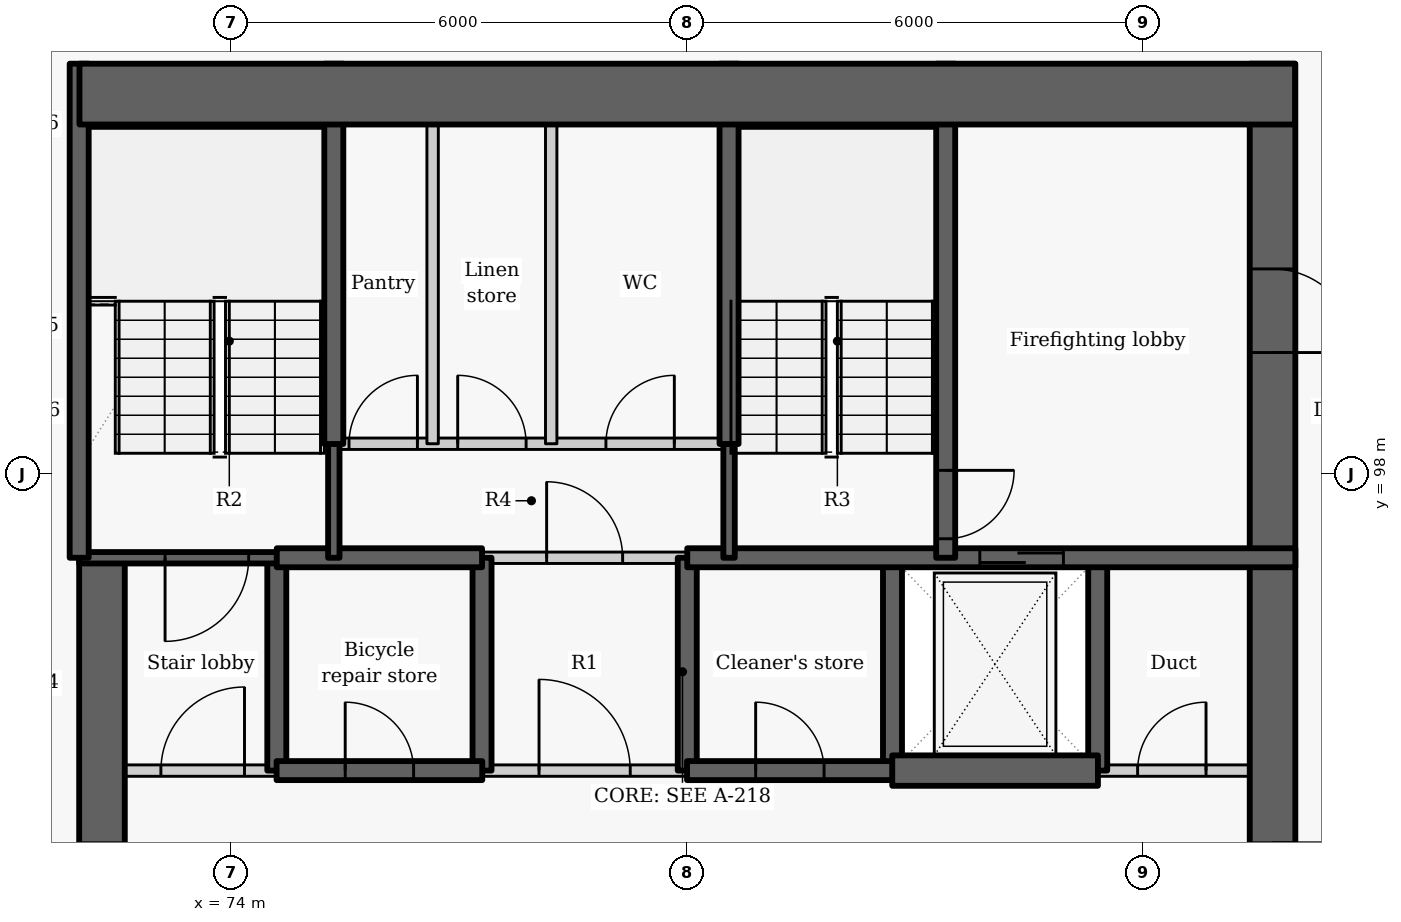
"""IFC4 building model, lengths in metres.
Left out: names, types, materials, properties, quantities, classifications, styles, units other than length and angle.
Written with IfcOpenShell. Run it as: python <this file> out.ifc"""

import sys

from ifc_helpers import new_model, si_unit, direction, frame, frame_2d, origin, place, context, subcontext, project, spatial, rectangle, extrude, element, fill, save


model = new_model("IFC4")
c1 = context("Model", 3, precision=1e-05, world=origin(), true_north=direction((0.0, 1.0)))
c2 = subcontext(c1, "Body", "Model", "MODEL_VIEW")
j1 = project(units=[si_unit("LENGTHUNIT", "METRE"), si_unit("PLANEANGLEUNIT", "RADIAN")], contexts=[c1])
p1 = place(None, origin())
s1 = spatial("IfcSite", under=j1, at=p1, CompositionType="ELEMENT")
p2 = place(p1, origin())
s2 = spatial("IfcBuilding", under=s1, at=p2, CompositionType="ELEMENT")
p3 = place(p2, frame((0.0, 0.0, 87.6)))
s3 = spatial("IfcBuildingStorey", under=s2, at=p3, CompositionType="ELEMENT", Elevation=87.6)
p4 = place(p3, frame((74.6, 94.1, -0.275), z_axis=(0.0, 0.0, 1.0), x_axis=(0.0, 1.0, 0.0)))
e1 = element("IfcWall", 1, at=p4, inside=s3, PredefinedType="SHEAR", context=c2, shape_type="SweptSolid", body=[
    extrude(rectangle(XDim=2.8, YDim=0.25, at=frame_2d((1.4, 0.0))), origin(), (0.0, 0.0, 1.0), 3.3),
])
p5 = place(p3, frame((72.3, 87.8, -0.275), z_axis=(0.0, 0.0, 1.0), x_axis=(0.0, 1.0, 0.0)))
e2 = element("IfcWall", 2, at=p5, inside=s3, PredefinedType="SHEAR", context=c2, shape_type="SweptSolid", body=[
    extrude(rectangle(XDim=9.1, YDim=0.6, at=frame_2d((4.55, 0.0))), origin(), (0.0, 0.0, 1.0), 3.3),
])
p6 = place(p5, frame((3.85, 0.0, 0.275)))
e3 = element("IfcOpeningElement", 3, at=p6, cuts=e2, PredefinedType="OPENING", context=c2, shape_type="SweptSolid", body=[
    extrude(rectangle(XDim=1.5, YDim=2.1, at=frame_2d((0.75, 1.05))), frame((0.0, 0.31, 0.0), z_axis=(0.0, -1.0, 0.0), x_axis=(1.0, 0.0, 0.0)), (0.0, 0.0, 1.0), 0.62),
])
for number, where, z_axis, x_axis in (
    (4, (77.3, 94.1, -0.275), (0.0, 0.0, 1.0), (0.0, 1.0, 0.0)),
    (5, (80.0, 94.1, -0.275), (0.0, 0.0, 1.0), (0.0, 1.0, 0.0)),
    (6, (82.7, 94.1, -0.275), (0.0, 0.0, 1.0), (0.0, 1.0, 0.0)),
    (7, (85.4, 94.1, -0.275), (0.0, 0.0, 1.0), (0.0, 1.0, 0.0)),
):
    element("IfcWall", number, at=place(p3, frame(where, z_axis=z_axis, x_axis=x_axis)), inside=s3, PredefinedType="SHEAR", context=c2, shape_type="SweptSolid", body=[
        extrude(rectangle(XDim=2.8, YDim=0.25, at=frame_2d((1.4, 0.0))), origin(), (0.0, 0.0, 1.0), 3.3),
    ])
p7 = place(p3, frame((87.7, 103.4, -0.275), z_axis=(0.0, 0.0, 1.0), x_axis=(0.0, -1.0, 0.0)))
e8 = element("IfcWall", 8, at=p7, inside=s3, PredefinedType="SHEAR", context=c2, shape_type="SweptSolid", body=[
    extrude(rectangle(XDim=15.6, YDim=0.6, at=frame_2d((7.8, 0.0))), origin(), (0.0, 0.0, 1.0), 3.3),
])
p8 = place(p7, frame((10.25, 0.0, 0.275)))
e9 = element("IfcOpeningElement", 9, at=p8, cuts=e8, PredefinedType="OPENING", context=c2, shape_type="SweptSolid", body=[
    extrude(rectangle(XDim=1.5, YDim=2.1, at=frame_2d((0.75, 1.05))), frame((0.0, 0.31, 0.0), z_axis=(0.0, -1.0, 0.0), x_axis=(1.0, 0.0, 0.0)), (0.0, 0.0, 1.0), 0.62),
])
p9 = place(p7, frame((2.7, 0.0, 0.275)))
e10 = element("IfcOpeningElement", 10, at=p9, cuts=e8, PredefinedType="OPENING", context=c2, shape_type="SweptSolid", body=[
    extrude(rectangle(XDim=1.1, YDim=2.1, at=frame_2d((0.55, 1.05))), frame((0.0, 0.31, 0.0), z_axis=(0.0, -1.0, 0.0), x_axis=(1.0, 0.0, 0.0)), (0.0, 0.0, 1.0), 0.62),
])
p10 = place(p3, frame((72.0, 94.1, 0.0), z_axis=(0.0, 0.0, 1.0), x_axis=(1.0, 0.0, 0.0)))
e11 = element("IfcWall", 11, at=p10, inside=s3, PredefinedType="PARTITIONING", context=c2, shape_type="SweptSolid", body=[
    extrude(rectangle(XDim=2.603, YDim=0.15, at=frame_2d((1.302, 0.0))), origin(), (0.0, 0.0, 1.0), 3.025),
])
p11 = place(p10, frame((1.075, 0.0, 0.0)))
e12 = element("IfcOpeningElement", 12, at=p11, cuts=e11, PredefinedType="OPENING", context=c2, shape_type="SweptSolid", body=[
    extrude(rectangle(XDim=1.1, YDim=2.1, at=frame_2d((0.55, 1.05))), frame((0.0, 0.085, 0.0), z_axis=(0.0, -1.0, 0.0), x_axis=(1.0, 0.0, 0.0)), (0.0, 0.0, 1.0), 0.17),
])
p12 = place(p3, frame((77.297, 94.1, 0.0), z_axis=(0.0, 0.0, 1.0), x_axis=(1.0, 0.0, 0.0)))
e13 = element("IfcWall", 13, at=p12, inside=s3, PredefinedType="PARTITIONING", context=c2, shape_type="SweptSolid", body=[
    extrude(rectangle(XDim=2.706, YDim=0.15, at=frame_2d((1.353, 0.0))), origin(), (0.0, 0.0, 1.0), 3.025),
])
p13 = place(p12, frame((0.753, 0.0, 0.0)))
e14 = element("IfcOpeningElement", 14, at=p13, cuts=e13, PredefinedType="OPENING", context=c2, shape_type="SweptSolid", body=[
    extrude(rectangle(XDim=1.2, YDim=2.1, at=frame_2d((0.6, 1.05))), frame((0.0, 0.085, 0.0), z_axis=(0.0, -1.0, 0.0), x_axis=(1.0, 0.0, 0.0)), (0.0, 0.0, 1.0), 0.17),
])
p14 = place(p3, frame((85.397, 94.1, 0.0), z_axis=(0.0, 0.0, 1.0), x_axis=(1.0, 0.0, 0.0)))
e15 = element("IfcWall", 15, at=p14, inside=s3, PredefinedType="PARTITIONING", context=c2, shape_type="SweptSolid", body=[
    extrude(rectangle(XDim=2.603, YDim=0.15, at=frame_2d((1.302, 0.0))), origin(), (0.0, 0.0, 1.0), 3.025),
])
p15 = place(p14, frame((0.528, 0.0, 0.0)))
e16 = element("IfcOpeningElement", 16, at=p15, cuts=e15, PredefinedType="OPENING", context=c2, shape_type="SweptSolid", body=[
    extrude(rectangle(XDim=0.9, YDim=2.1, at=frame_2d((0.45, 1.05))), frame((0.0, 0.085, 0.0), z_axis=(0.0, -1.0, 0.0), x_axis=(1.0, 0.0, 0.0)), (0.0, 0.0, 1.0), 0.17),
])
p16 = place(p3, frame((74.597, 94.1, -0.275), z_axis=(0.0, 0.0, 1.0), x_axis=(1.0, 0.0, 0.0)))
e17 = element("IfcWall", 17, at=p16, inside=s3, PredefinedType="SHEAR", context=c2, shape_type="SweptSolid", body=[
    extrude(rectangle(XDim=2.706, YDim=0.25, at=frame_2d((1.353, 0.0))), origin(), (0.0, 0.0, 1.0), 3.3),
])
p17 = place(p16, frame((0.903, 0.0, 0.275)))
e18 = element("IfcOpeningElement", 18, at=p17, cuts=e17, PredefinedType="OPENING", context=c2, shape_type="SweptSolid", body=[
    extrude(rectangle(XDim=0.9, YDim=2.1, at=frame_2d((0.45, 1.05))), frame((0.0, 0.135, 0.0), z_axis=(0.0, -1.0, 0.0), x_axis=(1.0, 0.0, 0.0)), (0.0, 0.0, 1.0), 0.27),
])
p18 = place(p3, frame((79.997, 94.1, -0.275), z_axis=(0.0, 0.0, 1.0), x_axis=(1.0, 0.0, 0.0)))
e19 = element("IfcWall", 19, at=p18, inside=s3, PredefinedType="SHEAR", context=c2, shape_type="SweptSolid", body=[
    extrude(rectangle(XDim=2.706, YDim=0.25, at=frame_2d((1.353, 0.0))), origin(), (0.0, 0.0, 1.0), 3.3),
])
p19 = place(p18, frame((0.903, 0.0, 0.275)))
e20 = element("IfcOpeningElement", 20, at=p19, cuts=e19, PredefinedType="OPENING", context=c2, shape_type="SweptSolid", body=[
    extrude(rectangle(XDim=0.9, YDim=2.1, at=frame_2d((0.45, 1.05))), frame((0.0, 0.135, 0.0), z_axis=(0.0, -1.0, 0.0), x_axis=(1.0, 0.0, 0.0)), (0.0, 0.0, 1.0), 0.27),
])
p20 = place(p3, frame((82.697, 94.1, -0.275), z_axis=(0.0, 0.0, 1.0), x_axis=(1.0, 0.0, 0.0)))
e21 = element("IfcWall", 21, at=p20, inside=s3, PredefinedType="SHEAR", context=c2, shape_type="SweptSolid", body=[
    extrude(rectangle(XDim=2.706, YDim=0.4, at=frame_2d((1.353, 0.0))), origin(), (0.0, 0.0, 1.0), 3.3),
])
p21 = place(p3, frame((74.6, 96.9, -0.275), z_axis=(0.0, 0.0, 1.0), x_axis=(-1.0, 0.0, 0.0)))
e22 = element("IfcWall", 22, at=p21, inside=s3, PredefinedType="SHEAR", context=c2, shape_type="SweptSolid", body=[
    extrude(rectangle(XDim=2.6, YDim=0.15, at=frame_2d((1.3, 0.0))), origin(), (0.0, 0.0, 1.0), 3.3),
])
p22 = place(p21, frame((0.37, 0.0, 0.275)))
e23 = element("IfcOpeningElement", 23, at=p22, cuts=e22, PredefinedType="OPENING", context=c2, shape_type="SweptSolid", body=[
    extrude(rectangle(XDim=1.1, YDim=2.1, at=frame_2d((0.55, 1.05))), frame((0.0, 0.085, 0.0), z_axis=(0.0, -1.0, 0.0), x_axis=(1.0, 0.0, 0.0)), (0.0, 0.0, 1.0), 0.17),
])
p23 = place(p3, frame((74.6, 96.9, -0.275), z_axis=(0.0, 0.0, 1.0), x_axis=(1.0, 0.0, 0.0)))
e24 = element("IfcWall", 24, at=p23, inside=s3, PredefinedType="SHEAR", context=c2, shape_type="SweptSolid", body=[
    extrude(rectangle(XDim=2.7, YDim=0.25, at=frame_2d((1.35, 0.0))), origin(), (0.0, 0.0, 1.0), 3.3),
])
p24 = place(p3, frame((80.0, 96.9, -0.275), z_axis=(0.0, 0.0, 1.0), x_axis=(1.0, 0.0, 0.0)))
e25 = element("IfcWall", 25, at=p24, inside=s3, PredefinedType="SHEAR", context=c2, shape_type="SweptSolid", body=[
    extrude(rectangle(XDim=8.0, YDim=0.25, at=frame_2d((4.0, 0.0))), origin(), (0.0, 0.0, 1.0), 3.3),
])
p25 = place(p24, frame((3.849, 0.0, 0.275)))
e26 = element("IfcOpeningElement", 26, at=p25, cuts=e25, PredefinedType="OPENING", context=c2, shape_type="SweptSolid", body=[
    extrude(rectangle(XDim=1.1, YDim=2.1, at=frame_2d((0.55, 1.05))), frame((0.0, 0.135, 0.0), z_axis=(0.0, -1.0, 0.0), x_axis=(1.0, 0.0, 0.0)), (0.0, 0.0, 1.0), 0.27),
])
p26 = place(p3, frame((77.3, 96.9, 0.0), z_axis=(0.0, 0.0, 1.0), x_axis=(1.0, 0.0, 0.0)))
e27 = element("IfcWall", 27, at=p26, inside=s3, PredefinedType="PARTITIONING", context=c2, shape_type="SweptSolid", body=[
    extrude(rectangle(XDim=2.7, YDim=0.15, at=frame_2d((1.35, 0.0))), origin(), (0.0, 0.0, 1.0), 3.025),
])
p27 = place(p26, frame((0.85, 0.0, 0.0)))
e28 = element("IfcOpeningElement", 28, at=p27, cuts=e27, PredefinedType="OPENING", context=c2, shape_type="SweptSolid", body=[
    extrude(rectangle(XDim=1.0, YDim=2.1, at=frame_2d((0.5, 1.05))), frame((0.0, 0.085, 0.0), z_axis=(0.0, -1.0, 0.0), x_axis=(1.0, 0.0, 0.0)), (0.0, 0.0, 1.0), 0.17),
])
p28 = place(p3, frame((75.35, 96.9, -0.275), z_axis=(0.0, 0.0, 1.0), x_axis=(0.0, 1.0, 0.0)))
e29 = element("IfcWall", 29, at=p28, inside=s3, PredefinedType="SHEAR", context=c2, shape_type="SweptSolid", body=[
    extrude(rectangle(XDim=1.503, YDim=0.15, at=frame_2d((0.751, 0.0))), origin(), (0.0, 0.0, 1.0), 3.3),
])
p29 = place(p3, frame((75.35, 98.397, -0.275), z_axis=(0.0, 0.0, 1.0), x_axis=(0.0, 1.0, 0.0)))
e30 = element("IfcWall", 30, at=p29, inside=s3, PredefinedType="SHEAR", context=c2, shape_type="SweptSolid", body=[
    extrude(rectangle(XDim=5.003, YDim=0.25, at=frame_2d((2.501, 0.0))), origin(), (0.0, 0.0, 1.0), 3.3),
])
p30 = place(p3, frame((72.0, 96.9, -0.275), z_axis=(0.0, 0.0, 1.0), x_axis=(0.0, 1.0, 0.0)))
e31 = element("IfcWall", 31, at=p30, inside=s3, PredefinedType="SHEAR", context=c2, shape_type="SweptSolid", body=[
    extrude(rectangle(XDim=6.5, YDim=0.25, at=frame_2d((3.25, 0.0))), origin(), (0.0, 0.0, 1.0), 3.3),
])
p31 = place(p3, frame((83.4, 103.4, -0.275), z_axis=(0.0, 0.0, 1.0), x_axis=(0.0, -1.0, 0.0)))
e32 = element("IfcWall", 32, at=p31, inside=s3, PredefinedType="SHEAR", context=c2, shape_type="SweptSolid", body=[
    extrude(rectangle(XDim=6.5, YDim=0.25, at=frame_2d((3.25, 0.0))), origin(), (0.0, 0.0, 1.0), 3.3),
])
p32 = place(p31, frame((5.35, 0.0, 0.275)))
e33 = element("IfcOpeningElement", 33, at=p32, cuts=e32, PredefinedType="OPENING", context=c2, shape_type="SweptSolid", body=[
    extrude(rectangle(XDim=0.9, YDim=2.1, at=frame_2d((0.45, 1.05))), frame((0.0, 0.135, 0.0), z_axis=(0.0, -1.0, 0.0), x_axis=(1.0, 0.0, 0.0)), (0.0, 0.0, 1.0), 0.27),
])
p33 = place(p3, frame((80.55, 96.9, -0.275), z_axis=(0.0, 0.0, 1.0), x_axis=(0.0, 1.0, 0.0)))
e34 = element("IfcWall", 34, at=p33, inside=s3, PredefinedType="SHEAR", context=c2, shape_type="SweptSolid", body=[
    extrude(rectangle(XDim=1.503, YDim=0.15, at=frame_2d((0.751, 0.0))), origin(), (0.0, 0.0, 1.0), 3.3),
])
p34 = place(p3, frame((80.55, 98.397, -0.275), z_axis=(0.0, 0.0, 1.0), x_axis=(0.0, 1.0, 0.0)))
e35 = element("IfcWall", 35, at=p34, inside=s3, PredefinedType="SHEAR", context=c2, shape_type="SweptSolid", body=[
    extrude(rectangle(XDim=5.003, YDim=0.25, at=frame_2d((2.501, 0.0))), origin(), (0.0, 0.0, 1.0), 3.3),
])
p35 = place(p3, frame((75.35, 98.4, 0.0), z_axis=(0.0, 0.0, 1.0), x_axis=(1.0, 0.0, 0.0)))
e36 = element("IfcWall", 36, at=p35, inside=s3, PredefinedType="PARTITIONING", context=c2, shape_type="SweptSolid", body=[
    extrude(rectangle(XDim=5.2, YDim=0.15, at=frame_2d((2.6, 0.0))), origin(), (0.0, 0.0, 1.0), 3.025),
])
p36 = place(p35, frame((0.2, 0.0, 0.0)))
e37 = element("IfcOpeningElement", 37, at=p36, cuts=e36, PredefinedType="OPENING", context=c2, shape_type="SweptSolid", body=[
    extrude(rectangle(XDim=0.9, YDim=2.1, at=frame_2d((0.45, 1.05))), frame((0.0, 0.085, 0.0), z_axis=(0.0, -1.0, 0.0), x_axis=(1.0, 0.0, 0.0)), (0.0, 0.0, 1.0), 0.17),
])
p37 = place(p35, frame((1.63, 0.0, 0.0)))
e38 = element("IfcOpeningElement", 38, at=p37, cuts=e36, PredefinedType="OPENING", context=c2, shape_type="SweptSolid", body=[
    extrude(rectangle(XDim=0.9, YDim=2.1, at=frame_2d((0.45, 1.05))), frame((0.0, 0.085, 0.0), z_axis=(0.0, -1.0, 0.0), x_axis=(1.0, 0.0, 0.0)), (0.0, 0.0, 1.0), 0.17),
])
p38 = place(p35, frame((3.58, 0.0, 0.0)))
e39 = element("IfcOpeningElement", 39, at=p38, cuts=e36, PredefinedType="OPENING", context=c2, shape_type="SweptSolid", body=[
    extrude(rectangle(XDim=0.9, YDim=2.1, at=frame_2d((0.45, 1.05))), frame((0.0, 0.085, 0.0), z_axis=(0.0, -1.0, 0.0), x_axis=(1.0, 0.0, 0.0)), (0.0, 0.0, 1.0), 0.17),
])
for number, where, z_axis, x_axis in (
    (40, (76.65, 98.4, 0.0), (0.0, 0.0, 1.0), (0.0, 1.0, 0.0)),
    (41, (78.21, 98.4, 0.0), (0.0, 0.0, 1.0), (0.0, 1.0, 0.0)),
):
    element("IfcWall", number, at=place(p3, frame(where, z_axis=z_axis, x_axis=x_axis)), inside=s3, PredefinedType="PARTITIONING", context=c2, shape_type="SweptSolid", body=[
        extrude(rectangle(XDim=5.0, YDim=0.15, at=frame_2d((2.5, 0.0))), origin(), (0.0, 0.0, 1.0), 3.025),
    ])
p39 = place(p3, frame((72.004, 103.0, -0.275), z_axis=(0.0, 0.0, 1.0), x_axis=(1.0, 0.0, 0.0)))
e42 = element("IfcWall", 42, at=p39, inside=s3, PredefinedType="SHEAR", context=c2, shape_type="SweptSolid", body=[
    extrude(rectangle(XDim=15.992, YDim=0.8, at=frame_2d((7.996, 0.0))), origin(), (0.0, 0.0, 1.0), 3.3),
])
p40 = place(p11, origin())
e43 = element("IfcDoor", 43, at=p40, inside=s3, OperationType="SINGLE_SWING_RIGHT", PredefinedType="DOOR", context=c2, shape_type="SweptSolid", body=[
    extrude(rectangle(XDim=1.1, YDim=2.1, at=frame_2d((0.55, 1.05))), frame((0.0, 0.025, 0.0), z_axis=(0.0, -1.0, 0.0), x_axis=(1.0, 0.0, 0.0)), (0.0, 0.0, 1.0), 0.05),
])
fill(e12, e43)
p41 = place(p17, origin())
e44 = element("IfcDoor", 44, at=p41, inside=s3, OperationType="SINGLE_SWING_LEFT", PredefinedType="DOOR", context=c2, shape_type="SweptSolid", body=[
    extrude(rectangle(XDim=0.9, YDim=2.1, at=frame_2d((0.45, 1.05))), frame((0.0, 0.025, 0.0), z_axis=(0.0, -1.0, 0.0), x_axis=(1.0, 0.0, 0.0)), (0.0, 0.0, 1.0), 0.05),
])
fill(e18, e44)
p42 = place(p13, origin())
e45 = element("IfcDoor", 45, at=p42, inside=s3, OperationType="DOUBLE_DOOR_SINGLE_SWING", PredefinedType="DOOR", context=c2, shape_type="SweptSolid", body=[
    extrude(rectangle(XDim=1.2, YDim=2.1, at=frame_2d((0.6, 1.05))), frame((0.0, 0.025, 0.0), z_axis=(0.0, -1.0, 0.0), x_axis=(1.0, 0.0, 0.0)), (0.0, 0.0, 1.0), 0.05),
])
fill(e14, e45)
p43 = place(p19, origin())
e46 = element("IfcDoor", 46, at=p43, inside=s3, OperationType="SINGLE_SWING_LEFT", PredefinedType="DOOR", context=c2, shape_type="SweptSolid", body=[
    extrude(rectangle(XDim=0.9, YDim=2.1, at=frame_2d((0.45, 1.05))), frame((0.0, 0.025, 0.0), z_axis=(0.0, -1.0, 0.0), x_axis=(1.0, 0.0, 0.0)), (0.0, 0.0, 1.0), 0.05),
])
fill(e20, e46)
p44 = place(p25, origin())
e47 = element("IfcDoor", 47, at=p44, inside=s3, OperationType="SLIDING_TO_LEFT", PredefinedType="DOOR", context=c2, shape_type="SweptSolid", body=[
    extrude(rectangle(XDim=1.1, YDim=2.1, at=frame_2d((0.55, 1.05))), frame((0.0, 0.025, 0.0), z_axis=(0.0, -1.0, 0.0), x_axis=(1.0, 0.0, 0.0)), (0.0, 0.0, 1.0), 0.05),
])
fill(e26, e47)
p45 = place(p15, origin())
e48 = element("IfcDoor", 48, at=p45, inside=s3, OperationType="SINGLE_SWING_RIGHT", PredefinedType="DOOR", context=c2, shape_type="SweptSolid", body=[
    extrude(rectangle(XDim=0.9, YDim=2.1, at=frame_2d((0.45, 1.05))), frame((0.0, 0.025, 0.0), z_axis=(0.0, -1.0, 0.0), x_axis=(1.0, 0.0, 0.0)), (0.0, 0.0, 1.0), 0.05),
])
fill(e16, e48)
p46 = place(p27, origin())
e49 = element("IfcDoor", 49, at=p46, inside=s3, OperationType="SINGLE_SWING_LEFT", PredefinedType="DOOR", context=c2, shape_type="SweptSolid", body=[
    extrude(rectangle(XDim=1.0, YDim=2.1, at=frame_2d((0.5, 1.05))), frame((0.0, 0.025, 0.0), z_axis=(0.0, -1.0, 0.0), x_axis=(1.0, 0.0, 0.0)), (0.0, 0.0, 1.0), 0.05),
])
fill(e28, e49)
p47 = place(p36, origin())
e50 = element("IfcDoor", 50, at=p47, inside=s3, OperationType="SINGLE_SWING_RIGHT", PredefinedType="DOOR", context=c2, shape_type="SweptSolid", body=[
    extrude(rectangle(XDim=0.9, YDim=2.1, at=frame_2d((0.45, 1.05))), frame((0.0, 0.025, 0.0), z_axis=(0.0, -1.0, 0.0), x_axis=(1.0, 0.0, 0.0)), (0.0, 0.0, 1.0), 0.05),
])
fill(e37, e50)
p48 = place(p37, origin())
e51 = element("IfcDoor", 51, at=p48, inside=s3, OperationType="SINGLE_SWING_LEFT", PredefinedType="DOOR", context=c2, shape_type="SweptSolid", body=[
    extrude(rectangle(XDim=0.9, YDim=2.1, at=frame_2d((0.45, 1.05))), frame((0.0, 0.025, 0.0), z_axis=(0.0, -1.0, 0.0), x_axis=(1.0, 0.0, 0.0)), (0.0, 0.0, 1.0), 0.05),
])
fill(e38, e51)
p49 = place(p38, origin())
e52 = element("IfcDoor", 52, at=p49, inside=s3, OperationType="SINGLE_SWING_RIGHT", PredefinedType="DOOR", context=c2, shape_type="SweptSolid", body=[
    extrude(rectangle(XDim=0.9, YDim=2.1, at=frame_2d((0.45, 1.05))), frame((0.0, 0.025, 0.0), z_axis=(0.0, -1.0, 0.0), x_axis=(1.0, 0.0, 0.0)), (0.0, 0.0, 1.0), 0.05),
])
fill(e39, e52)
p50 = place(p22, origin())
e53 = element("IfcDoor", 53, at=p50, inside=s3, OperationType="SINGLE_SWING_RIGHT", PredefinedType="DOOR", context=c2, shape_type="SweptSolid", body=[
    extrude(rectangle(XDim=1.1, YDim=2.1, at=frame_2d((0.55, 1.05))), frame((0.0, 0.025, 0.0), z_axis=(0.0, -1.0, 0.0), x_axis=(1.0, 0.0, 0.0)), (0.0, 0.0, 1.0), 0.05),
])
fill(e23, e53)
p51 = place(p32, origin())
e54 = element("IfcDoor", 54, at=p51, inside=s3, OperationType="SINGLE_SWING_LEFT", PredefinedType="DOOR", context=c2, shape_type="SweptSolid", body=[
    extrude(rectangle(XDim=0.9, YDim=2.1, at=frame_2d((0.45, 1.05))), frame((0.0, 0.025, 0.0), z_axis=(0.0, -1.0, 0.0), x_axis=(1.0, 0.0, 0.0)), (0.0, 0.0, 1.0), 0.05),
])
fill(e33, e54)
p52 = place(p6, origin())
e55 = element("IfcDoor", 55, at=p52, inside=s3, OperationType="DOUBLE_DOOR_SINGLE_SWING", PredefinedType="DOOR", context=c2, shape_type="SweptSolid", body=[
    extrude(rectangle(XDim=1.5, YDim=2.1, at=frame_2d((0.75, 1.05))), frame((0.0, 0.025, 0.0), z_axis=(0.0, -1.0, 0.0), x_axis=(1.0, 0.0, 0.0)), (0.0, 0.0, 1.0), 0.05),
])
fill(e3, e55)
p53 = place(p9, origin())
e56 = element("IfcDoor", 56, at=p53, inside=s3, OperationType="SINGLE_SWING_RIGHT", PredefinedType="DOOR", context=c2, shape_type="SweptSolid", body=[
    extrude(rectangle(XDim=1.1, YDim=2.1, at=frame_2d((0.55, 1.05))), frame((0.0, 0.025, 0.0), z_axis=(0.0, -1.0, 0.0), x_axis=(1.0, 0.0, 0.0)), (0.0, 0.0, 1.0), 0.05),
])
fill(e10, e56)
save(model, sys.argv[1])
